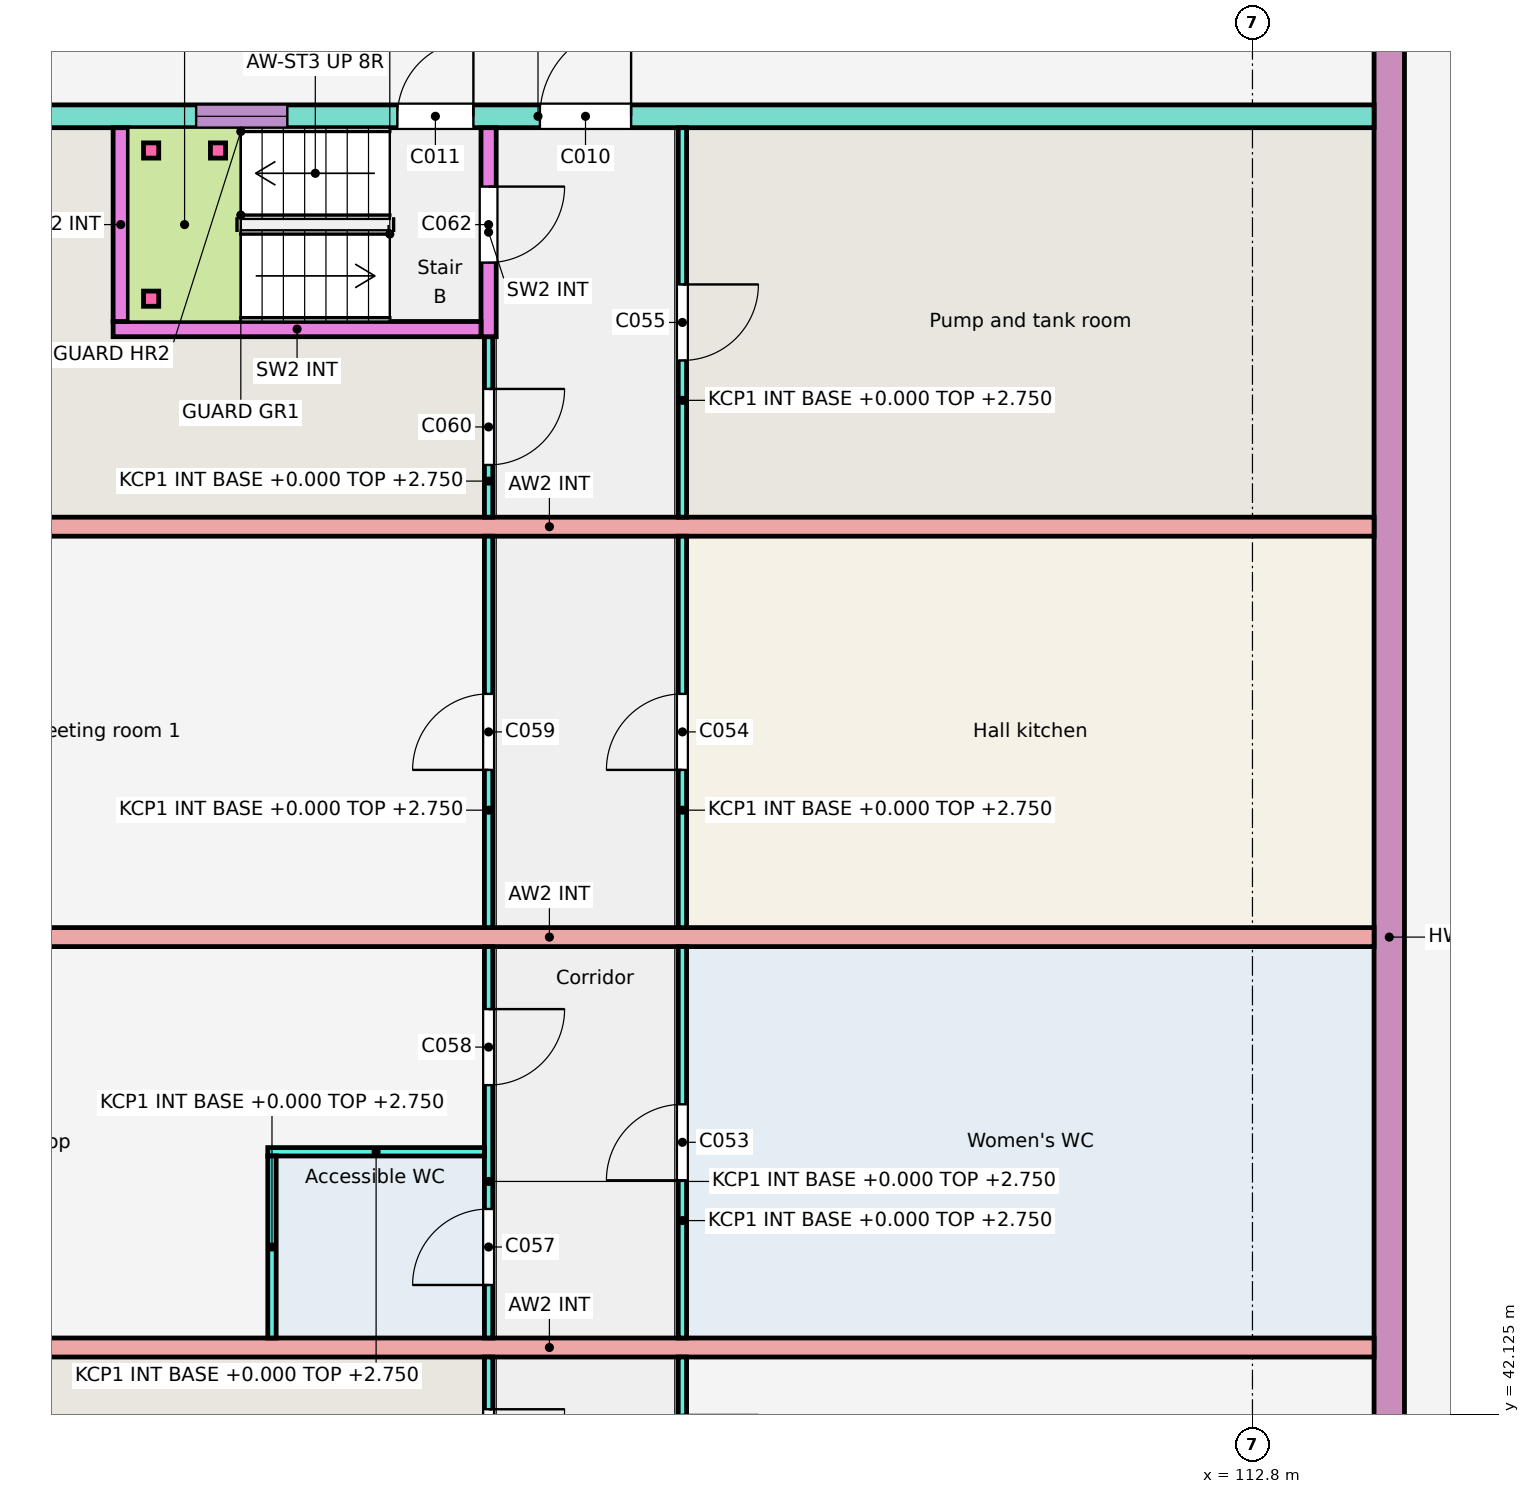
"""IFC4 building model, lengths in metres.
Left out: names, types, materials, properties, quantities, classifications, styles, units other than length and angle.
Written with IfcOpenShell. Run it as: python <this file> out.ifc"""

import sys

from ifc_helpers import new_model, si_unit, direction, frame, frame_2d, origin, origin_2d, place, context, subcontext, project, spatial, rectangle, extrude, element, fill, save


model = new_model("IFC4")
c1 = context("Model", 3, precision=1e-05, world=origin(), true_north=direction((0.0, 1.0)))
c2 = subcontext(c1, "Body", "Model", "MODEL_VIEW")
j1 = project(units=[si_unit("LENGTHUNIT", "METRE"), si_unit("PLANEANGLEUNIT", "RADIAN")], contexts=[c1])
p1 = place(None, origin())
s1 = spatial("IfcSite", under=j1, at=p1, CompositionType="ELEMENT")
p2 = place(p1, origin())
s2 = spatial("IfcBuilding", under=s1, at=p2, CompositionType="ELEMENT")
p3 = place(p2, origin())
s3 = spatial("IfcBuildingStorey", under=s2, at=p3, CompositionType="ELEMENT", Elevation=0.0)
p4 = place(p3, frame((114.6, 32.0, -0.25), z_axis=(0.0, 0.0, 1.0), x_axis=(0.0, 1.0, 0.0)))
e1 = element("IfcWall", 1, at=p4, inside=s3, PredefinedType="SOLIDWALL", context=c2, shape_type="SweptSolid", body=[
    extrude(rectangle(XDim=32.8, YDim=0.4, at=frame_2d((16.4, 0.0))), origin(), (0.0, 0.0, 1.0), 3.25),
])
p5 = place(p4, frame((2.2, 0.0, 0.25)))
e2 = element("IfcOpeningElement", 2, at=p5, cuts=e1, PredefinedType="OPENING", context=c2, shape_type="SweptSolid", body=[
    extrude(rectangle(XDim=1.8, YDim=2.1, at=frame_2d((0.9, 1.05))), frame((0.0, 0.21, 0.0), z_axis=(0.0, -1.0, 0.0), x_axis=(1.0, 0.0, 0.0)), (0.0, 0.0, 1.0), 0.42),
])
p6 = place(p4, frame((29.0, 0.0, 0.25)))
e3 = element("IfcOpeningElement", 3, at=p6, cuts=e1, PredefinedType="OPENING", context=c2, shape_type="SweptSolid", body=[
    extrude(rectangle(XDim=1.8, YDim=2.1, at=frame_2d((0.9, 1.05))), frame((0.0, 0.21, 0.0), z_axis=(0.0, -1.0, 0.0), x_axis=(1.0, 0.0, 0.0)), (0.0, 0.0, 1.0), 0.42),
])
p7 = place(p3, frame((114.4, 59.2, -0.25), z_axis=(0.0, 0.0, 1.0), x_axis=(-1.0, 0.0, 0.0)))
e4 = element("IfcWall", 4, at=p7, inside=s3, PredefinedType="SOLIDWALL", context=c2, shape_type="SweptSolid", body=[
    extrude(rectangle(XDim=22.0, YDim=0.3, at=frame_2d((11.0, 0.0))), origin(), (0.0, 0.0, 1.0), 3.25),
])
p8 = place(p7, frame((14.298, 0.0, 1.15)))
e5 = element("IfcOpeningElement", 5, at=p8, cuts=e4, PredefinedType="OPENING", context=c2, shape_type="SweptSolid", body=[
    extrude(rectangle(XDim=1.2, YDim=1.5, at=frame_2d((0.6, 0.75))), frame((0.0, 0.16, 0.0), z_axis=(0.0, -1.0, 0.0), x_axis=(1.0, 0.0, 0.0)), (0.0, 0.0, 1.0), 0.32),
])
p9 = place(p7, frame((9.775, 0.0, 0.25)))
e6 = element("IfcOpeningElement", 6, at=p9, cuts=e4, PredefinedType="OPENING", context=c2, shape_type="SweptSolid", body=[
    extrude(rectangle(XDim=1.2, YDim=2.1, at=frame_2d((0.6, 1.05))), frame((0.0, 0.16, 0.0), z_axis=(0.0, -1.0, 0.0), x_axis=(1.0, 0.0, 0.0)), (0.0, 0.0, 1.0), 0.32),
])
p10 = place(p7, frame((11.85, 0.0, 0.25)))
e7 = element("IfcOpeningElement", 7, at=p10, cuts=e4, PredefinedType="OPENING", context=c2, shape_type="SweptSolid", body=[
    extrude(rectangle(XDim=1.0, YDim=2.1, at=frame_2d((0.5, 1.05))), frame((0.0, 0.16, 0.0), z_axis=(0.0, -1.0, 0.0), x_axis=(1.0, 0.0, 0.0)), (0.0, 0.0, 1.0), 0.32),
])
for number, where, z_axis, x_axis in (
    (8, (114.4, 43.0, -0.25), (0.0, 0.0, 1.0), (-1.0, 0.0, 0.0)),
    (9, (114.4, 48.4, -0.25), (0.0, 0.0, 1.0), (-1.0, 0.0, 0.0)),
    (10, (114.4, 53.8, -0.25), (0.0, 0.0, 1.0), (-1.0, 0.0, 0.0)),
):
    element("IfcWall", number, at=place(p3, frame(where, z_axis=z_axis, x_axis=x_axis)), inside=s3, PredefinedType="SOLIDWALL", context=c2, shape_type="SweptSolid", body=[
        extrude(rectangle(XDim=21.7, YDim=0.25, at=frame_2d((10.85, 0.0))), origin(), (0.0, 0.0, 1.0), 3.25),
    ])
for number, where, z_axis, x_axis in (
    (11, (98.31, 56.8, 0.0), (0.0, 0.0, 1.0), (1.0, 0.0, 0.0)),
    (12, (98.31, 58.75, 0.0), (0.0, 0.0, 1.0), (1.0, 0.0, 0.0)),
    (13, (99.19, 58.75, 0.0), (0.0, 0.0, 1.0), (1.0, 0.0, 0.0)),
):
    element("IfcColumn", number, at=place(p3, frame(where, z_axis=z_axis, x_axis=x_axis)), inside=s3, PredefinedType="COLUMN", context=c2, shape_type="SweptSolid", body=[
        extrude(rectangle(XDim=0.2, YDim=0.2, at=origin_2d()), origin(), (0.0, 0.0, 1.0), 1.3),
    ])
p11 = place(p3, frame((105.3, 40.35, 0.0), z_axis=(0.0, 0.0, 1.0), x_axis=(0.0, 1.0, 0.0)))
e14 = element("IfcWall", 14, at=p11, inside=s3, PredefinedType="PARTITIONING", context=c2, shape_type="SweptSolid", body=[
    extrude(rectangle(XDim=2.525, YDim=0.11, at=frame_2d((1.262, 0.0))), origin(), (0.0, 0.0, 1.0), 2.75),
])
p12 = place(p11, frame((0.762, 0.0, 0.0)))
e15 = element("IfcOpeningElement", 15, at=p12, cuts=e14, PredefinedType="OPENING", context=c2, shape_type="SweptSolid", body=[
    extrude(rectangle(XDim=1.0, YDim=2.1, at=frame_2d((0.5, 1.05))), frame((0.0, 0.065, 0.0), z_axis=(0.0, -1.0, 0.0), x_axis=(1.0, 0.0, 0.0)), (0.0, 0.0, 1.0), 0.13),
])
p13 = place(p3, frame((105.3, 43.125, 0.0), z_axis=(0.0, 0.0, 1.0), x_axis=(0.0, 1.0, 0.0)))
e16 = element("IfcWall", 16, at=p13, inside=s3, PredefinedType="PARTITIONING", context=c2, shape_type="SweptSolid", body=[
    extrude(rectangle(XDim=5.15, YDim=0.11, at=frame_2d((2.575, 0.0))), origin(), (0.0, 0.0, 1.0), 2.75),
])
p14 = place(p13, frame((2.075, 0.0, 0.0)))
e17 = element("IfcOpeningElement", 17, at=p14, cuts=e16, PredefinedType="OPENING", context=c2, shape_type="SweptSolid", body=[
    extrude(rectangle(XDim=1.0, YDim=2.1, at=frame_2d((0.5, 1.05))), frame((0.0, 0.065, 0.0), z_axis=(0.0, -1.0, 0.0), x_axis=(1.0, 0.0, 0.0)), (0.0, 0.0, 1.0), 0.13),
])
p15 = place(p3, frame((105.3, 48.525, 0.0), z_axis=(0.0, 0.0, 1.0), x_axis=(0.0, 1.0, 0.0)))
e18 = element("IfcWall", 18, at=p15, inside=s3, PredefinedType="PARTITIONING", context=c2, shape_type="SweptSolid", body=[
    extrude(rectangle(XDim=5.15, YDim=0.11, at=frame_2d((2.575, 0.0))), origin(), (0.0, 0.0, 1.0), 2.75),
])
p16 = place(p15, frame((2.075, 0.0, 0.0)))
e19 = element("IfcOpeningElement", 19, at=p16, cuts=e18, PredefinedType="OPENING", context=c2, shape_type="SweptSolid", body=[
    extrude(rectangle(XDim=1.0, YDim=2.1, at=frame_2d((0.5, 1.05))), frame((0.0, 0.065, 0.0), z_axis=(0.0, -1.0, 0.0), x_axis=(1.0, 0.0, 0.0)), (0.0, 0.0, 1.0), 0.13),
])
p17 = place(p3, frame((105.3, 53.925, 0.0), z_axis=(0.0, 0.0, 1.0), x_axis=(0.0, 1.0, 0.0)))
e20 = element("IfcWall", 20, at=p17, inside=s3, PredefinedType="PARTITIONING", context=c2, shape_type="SweptSolid", body=[
    extrude(rectangle(XDim=5.125, YDim=0.11, at=frame_2d((2.562, 0.0))), origin(), (0.0, 0.0, 1.0), 2.75),
])
p18 = place(p17, frame((2.062, 0.0, 0.0)))
e21 = element("IfcOpeningElement", 21, at=p18, cuts=e20, PredefinedType="OPENING", context=c2, shape_type="SweptSolid", body=[
    extrude(rectangle(XDim=1.0, YDim=2.1, at=frame_2d((0.5, 1.05))), frame((0.0, 0.065, 0.0), z_axis=(0.0, -1.0, 0.0), x_axis=(1.0, 0.0, 0.0)), (0.0, 0.0, 1.0), 0.13),
])
p19 = place(p3, frame((102.75, 40.5, 0.0), z_axis=(0.0, 0.0, 1.0), x_axis=(0.0, 1.0, 0.0)))
e22 = element("IfcWall", 22, at=p19, inside=s3, PredefinedType="PARTITIONING", context=c2, shape_type="SweptSolid", body=[
    extrude(rectangle(XDim=2.375, YDim=0.11, at=frame_2d((1.188, 0.0))), origin(), (0.0, 0.0, 1.0), 2.75),
])
p20 = place(p19, frame((0.688, 0.0, 0.0)))
e23 = element("IfcOpeningElement", 23, at=p20, cuts=e22, PredefinedType="OPENING", context=c2, shape_type="SweptSolid", body=[
    extrude(rectangle(XDim=1.0, YDim=2.1, at=frame_2d((0.5, 1.05))), frame((0.0, 0.065, 0.0), z_axis=(0.0, -1.0, 0.0), x_axis=(1.0, 0.0, 0.0)), (0.0, 0.0, 1.0), 0.13),
])
p21 = place(p3, frame((102.75, 43.125, 0.0), z_axis=(0.0, 0.0, 1.0), x_axis=(0.0, 1.0, 0.0)))
e24 = element("IfcWall", 24, at=p21, inside=s3, PredefinedType="PARTITIONING", context=c2, shape_type="SweptSolid", body=[
    extrude(rectangle(XDim=5.15, YDim=0.11, at=frame_2d((2.575, 0.0))), origin(), (0.0, 0.0, 1.0), 2.75),
])
p22 = place(p21, frame((0.698, 0.0, 0.0)))
e25 = element("IfcOpeningElement", 25, at=p22, cuts=e24, PredefinedType="OPENING", context=c2, shape_type="SweptSolid", body=[
    extrude(rectangle(XDim=1.0, YDim=2.1, at=frame_2d((0.5, 1.05))), frame((0.0, 0.065, 0.0), z_axis=(0.0, -1.0, 0.0), x_axis=(1.0, 0.0, 0.0)), (0.0, 0.0, 1.0), 0.13),
])
p23 = place(p21, frame((3.327, 0.0, 0.0)))
e26 = element("IfcOpeningElement", 26, at=p23, cuts=e24, PredefinedType="OPENING", context=c2, shape_type="SweptSolid", body=[
    extrude(rectangle(XDim=1.0, YDim=2.1, at=frame_2d((0.5, 1.05))), frame((0.0, 0.065, 0.0), z_axis=(0.0, -1.0, 0.0), x_axis=(1.0, 0.0, 0.0)), (0.0, 0.0, 1.0), 0.13),
])
p24 = place(p3, frame((102.75, 48.525, 0.0), z_axis=(0.0, 0.0, 1.0), x_axis=(0.0, 1.0, 0.0)))
e27 = element("IfcWall", 27, at=p24, inside=s3, PredefinedType="PARTITIONING", context=c2, shape_type="SweptSolid", body=[
    extrude(rectangle(XDim=5.15, YDim=0.11, at=frame_2d((2.575, 0.0))), origin(), (0.0, 0.0, 1.0), 2.75),
])
p25 = place(p24, frame((2.075, 0.0, 0.0)))
e28 = element("IfcOpeningElement", 28, at=p25, cuts=e27, PredefinedType="OPENING", context=c2, shape_type="SweptSolid", body=[
    extrude(rectangle(XDim=1.0, YDim=2.1, at=frame_2d((0.5, 1.05))), frame((0.0, 0.065, 0.0), z_axis=(0.0, -1.0, 0.0), x_axis=(1.0, 0.0, 0.0)), (0.0, 0.0, 1.0), 0.13),
])
p26 = place(p3, frame((102.75, 53.925, 0.0), z_axis=(0.0, 0.0, 1.0), x_axis=(0.0, 1.0, 0.0)))
e29 = element("IfcWall", 29, at=p26, inside=s3, PredefinedType="PARTITIONING", context=c2, shape_type="SweptSolid", body=[
    extrude(rectangle(XDim=2.375, YDim=0.11, at=frame_2d((1.188, 0.0))), origin(), (0.0, 0.0, 1.0), 2.75),
])
p27 = place(p26, frame((0.688, 0.0, 0.0)))
e30 = element("IfcOpeningElement", 30, at=p27, cuts=e29, PredefinedType="OPENING", context=c2, shape_type="SweptSolid", body=[
    extrude(rectangle(XDim=1.0, YDim=2.1, at=frame_2d((0.5, 1.05))), frame((0.0, 0.065, 0.0), z_axis=(0.0, -1.0, 0.0), x_axis=(1.0, 0.0, 0.0)), (0.0, 0.0, 1.0), 0.13),
])
p28 = place(p3, frame((102.75, 56.3, 0.0), z_axis=(0.0, 0.0, 1.0), x_axis=(0.0, 1.0, 0.0)))
e31 = element("IfcWall", 31, at=p28, inside=s3, PredefinedType="SOLIDWALL", context=c2, shape_type="SweptSolid", body=[
    extrude(rectangle(XDim=2.75, YDim=0.2, at=frame_2d((1.375, 0.0))), origin(), (0.0, 0.0, 1.0), 2.75),
])
p29 = place(p28, frame((0.975, 0.0, 0.0)))
e32 = element("IfcOpeningElement", 32, at=p29, cuts=e31, PredefinedType="OPENING", context=c2, shape_type="SweptSolid", body=[
    extrude(rectangle(XDim=1.0, YDim=2.1, at=frame_2d((0.5, 1.05))), frame((0.0, 0.11, 0.0), z_axis=(0.0, -1.0, 0.0), x_axis=(1.0, 0.0, 0.0)), (0.0, 0.0, 1.0), 0.22),
])
p30 = place(p3, frame((102.65, 56.4, 0.0), z_axis=(0.0, 0.0, 1.0), x_axis=(-1.0, 0.0, 0.0)))
e33 = element("IfcWall", 33, at=p30, inside=s3, PredefinedType="SOLIDWALL", context=c2, shape_type="SweptSolid", body=[
    extrude(rectangle(XDim=4.84, YDim=0.2, at=frame_2d((2.42, 0.0))), origin(), (0.0, 0.0, 1.0), 2.75),
])
p31 = place(p3, frame((97.91, 59.05, 0.0), z_axis=(0.0, 0.0, 1.0), x_axis=(0.0, -1.0, 0.0)))
e34 = element("IfcWall", 34, at=p31, inside=s3, PredefinedType="SOLIDWALL", context=c2, shape_type="SweptSolid", body=[
    extrude(rectangle(XDim=2.55, YDim=0.2, at=frame_2d((1.275, 0.0))), origin(), (0.0, 0.0, 1.0), 2.75),
])
p32 = place(p3, frame((102.695, 45.575, 0.0), z_axis=(0.0, 0.0, 1.0), x_axis=(-1.0, 0.0, 0.0)))
e35 = element("IfcWall", 35, at=p32, inside=s3, PredefinedType="PARTITIONING", context=c2, shape_type="SweptSolid", body=[
    extrude(rectangle(XDim=2.85, YDim=0.11, at=frame_2d((1.425, 0.0))), origin(), (0.0, 0.0, 1.0), 2.75),
])
p33 = place(p3, frame((99.9, 43.125, 0.0), z_axis=(0.0, 0.0, 1.0), x_axis=(0.0, 1.0, 0.0)))
e36 = element("IfcWall", 36, at=p33, inside=s3, PredefinedType="PARTITIONING", context=c2, shape_type="SweptSolid", body=[
    extrude(rectangle(XDim=2.395, YDim=0.11, at=frame_2d((1.198, 0.0))), origin(), (0.0, 0.0, 1.0), 2.75),
])
p34 = place(p8, origin())
e37 = element("IfcWindow", 37, at=p34, inside=s3, PartitioningType="SINGLE_PANEL", PredefinedType="WINDOW", context=c2, shape_type="SweptSolid", body=[
    extrude(rectangle(XDim=1.2, YDim=1.5, at=frame_2d((0.6, 0.75))), frame((0.0, 0.03, 0.0), z_axis=(0.0, -1.0, 0.0), x_axis=(1.0, 0.0, 0.0)), (0.0, 0.0, 1.0), 0.06),
])
fill(e5, e37)
p35 = place(p9, frame((1.2, 0.0, 0.0), z_axis=(0.0, 0.0, 1.0), x_axis=(-1.0, 0.0, 0.0)))
e38 = element("IfcDoor", 38, at=p35, inside=s3, OperationType="SINGLE_SWING_RIGHT", PredefinedType="DOOR", context=c2, shape_type="SweptSolid", body=[
    extrude(rectangle(XDim=1.2, YDim=2.1, at=frame_2d((0.6, 1.05))), frame((0.0, 0.025, 0.0), z_axis=(0.0, -1.0, 0.0), x_axis=(1.0, 0.0, 0.0)), (0.0, 0.0, 1.0), 0.05),
])
fill(e6, e38)
p36 = place(p10, frame((1.0, 0.0, 0.0), z_axis=(0.0, 0.0, 1.0), x_axis=(-1.0, 0.0, 0.0)))
e39 = element("IfcDoor", 39, at=p36, inside=s3, OperationType="SINGLE_SWING_RIGHT", PredefinedType="DOOR", context=c2, shape_type="SweptSolid", body=[
    extrude(rectangle(XDim=1.0, YDim=2.1, at=frame_2d((0.5, 1.05))), frame((0.0, 0.025, 0.0), z_axis=(0.0, -1.0, 0.0), x_axis=(1.0, 0.0, 0.0)), (0.0, 0.0, 1.0), 0.05),
])
fill(e7, e39)
p37 = place(p14, origin())
e40 = element("IfcDoor", 40, at=p37, inside=s3, OperationType="SINGLE_SWING_LEFT", PredefinedType="DOOR", context=c2, shape_type="SweptSolid", body=[
    extrude(rectangle(XDim=1.0, YDim=2.1, at=frame_2d((0.5, 1.05))), frame((0.0, 0.025, 0.0), z_axis=(0.0, -1.0, 0.0), x_axis=(1.0, 0.0, 0.0)), (0.0, 0.0, 1.0), 0.05),
])
fill(e17, e40)
p38 = place(p16, origin())
e41 = element("IfcDoor", 41, at=p38, inside=s3, OperationType="SINGLE_SWING_LEFT", PredefinedType="DOOR", context=c2, shape_type="SweptSolid", body=[
    extrude(rectangle(XDim=1.0, YDim=2.1, at=frame_2d((0.5, 1.05))), frame((0.0, 0.025, 0.0), z_axis=(0.0, -1.0, 0.0), x_axis=(1.0, 0.0, 0.0)), (0.0, 0.0, 1.0), 0.05),
])
fill(e19, e41)
p39 = place(p18, origin())
e42 = element("IfcDoor", 42, at=p39, inside=s3, OperationType="SINGLE_SWING_RIGHT", PredefinedType="DOOR", context=c2, shape_type="SweptSolid", body=[
    extrude(rectangle(XDim=1.0, YDim=2.1, at=frame_2d((0.5, 1.05))), frame((0.0, 0.025, 0.0), z_axis=(0.0, -1.0, 0.0), x_axis=(1.0, 0.0, 0.0)), (0.0, 0.0, 1.0), 0.05),
])
fill(e21, e42)
p40 = place(p20, origin())
e43 = element("IfcDoor", 43, at=p40, inside=s3, OperationType="SINGLE_SWING_RIGHT", PredefinedType="DOOR", context=c2, shape_type="SweptSolid", body=[
    extrude(rectangle(XDim=1.0, YDim=2.1, at=frame_2d((0.5, 1.05))), frame((0.0, 0.025, 0.0), z_axis=(0.0, -1.0, 0.0), x_axis=(1.0, 0.0, 0.0)), (0.0, 0.0, 1.0), 0.05),
])
fill(e23, e43)
p41 = place(p22, origin())
e44 = element("IfcDoor", 44, at=p41, inside=s3, OperationType="SINGLE_SWING_LEFT", PredefinedType="DOOR", context=c2, shape_type="SweptSolid", body=[
    extrude(rectangle(XDim=1.0, YDim=2.1, at=frame_2d((0.5, 1.05))), frame((0.0, 0.025, 0.0), z_axis=(0.0, -1.0, 0.0), x_axis=(1.0, 0.0, 0.0)), (0.0, 0.0, 1.0), 0.05),
])
fill(e25, e44)
p42 = place(p23, origin())
e45 = element("IfcDoor", 45, at=p42, inside=s3, OperationType="SINGLE_SWING_RIGHT", PredefinedType="DOOR", context=c2, shape_type="SweptSolid", body=[
    extrude(rectangle(XDim=1.0, YDim=2.1, at=frame_2d((0.5, 1.05))), frame((0.0, 0.025, 0.0), z_axis=(0.0, -1.0, 0.0), x_axis=(1.0, 0.0, 0.0)), (0.0, 0.0, 1.0), 0.05),
])
fill(e26, e45)
p43 = place(p25, origin())
e46 = element("IfcDoor", 46, at=p43, inside=s3, OperationType="SINGLE_SWING_LEFT", PredefinedType="DOOR", context=c2, shape_type="SweptSolid", body=[
    extrude(rectangle(XDim=1.0, YDim=2.1, at=frame_2d((0.5, 1.05))), frame((0.0, 0.025, 0.0), z_axis=(0.0, -1.0, 0.0), x_axis=(1.0, 0.0, 0.0)), (0.0, 0.0, 1.0), 0.05),
])
fill(e28, e46)
p44 = place(p27, origin())
e47 = element("IfcDoor", 47, at=p44, inside=s3, OperationType="SINGLE_SWING_RIGHT", PredefinedType="DOOR", context=c2, shape_type="SweptSolid", body=[
    extrude(rectangle(XDim=1.0, YDim=2.1, at=frame_2d((0.5, 1.05))), frame((0.0, 0.025, 0.0), z_axis=(0.0, -1.0, 0.0), x_axis=(1.0, 0.0, 0.0)), (0.0, 0.0, 1.0), 0.05),
])
fill(e30, e47)
p45 = place(p29, origin())
e48 = element("IfcDoor", 48, at=p45, inside=s3, OperationType="SINGLE_SWING_RIGHT", PredefinedType="DOOR", context=c2, shape_type="SweptSolid", body=[
    extrude(rectangle(XDim=1.0, YDim=2.1, at=frame_2d((0.5, 1.05))), frame((0.0, 0.025, 0.0), z_axis=(0.0, -1.0, 0.0), x_axis=(1.0, 0.0, 0.0)), (0.0, 0.0, 1.0), 0.05),
])
fill(e32, e48)
save(model, sys.argv[1])
